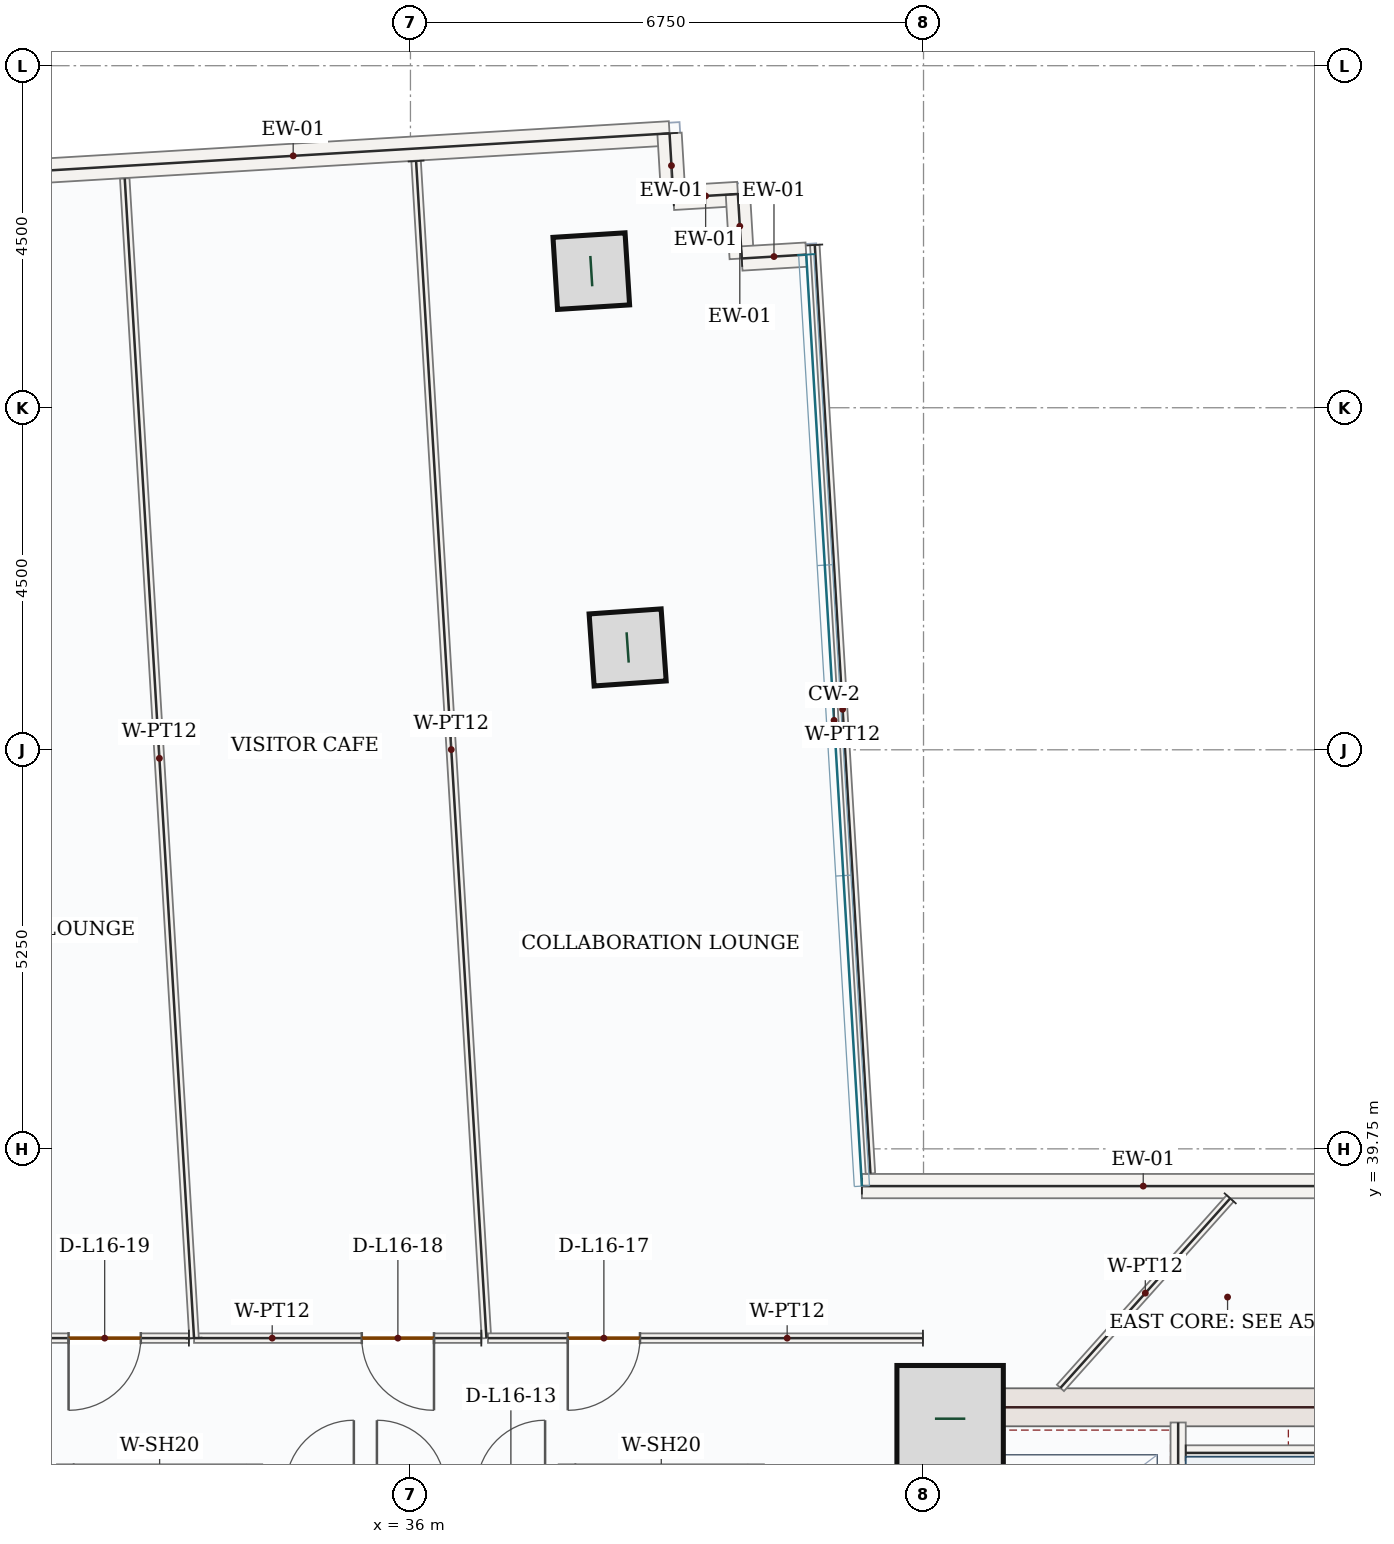
"""IFC4 building model, lengths in metres.
Left out: names, types, materials, properties, quantities, classifications, styles, units other than length and angle.
Written with IfcOpenShell. Run it as: python <this file> out.ifc"""

import sys

from ifc_helpers import new_model, si_unit, direction, frame, frame_2d, origin, origin_2d, place, context, subcontext, project, spatial, rectangle, hollow_rectangle, extrude, source, transform, mapped, element, fill, save


model = new_model("IFC4")
c1 = context("Model", 3, precision=1e-05, world=origin(), true_north=direction((0.0, 1.0)))
c2 = subcontext(c1, "Body", "Model", "MODEL_VIEW")
j1 = project(units=[si_unit("LENGTHUNIT", "METRE"), si_unit("PLANEANGLEUNIT", "RADIAN")], contexts=[c1])
p1 = place(None, origin())
s1 = spatial("IfcSite", under=j1, at=p1, CompositionType="ELEMENT")
p2 = place(p1, origin())
s2 = spatial("IfcBuilding", under=s1, at=p2, CompositionType="ELEMENT")
p3 = place(p2, frame((0.0, 0.0, 75.3)))
s3 = spatial("IfcBuildingStorey", under=s2, at=p3, CompositionType="ELEMENT", Elevation=75.3)
p4 = place(p3, frame((43.0, 28.05, 0.0), z_axis=(0.0, 0.0, 1.0), x_axis=(0.0, 1.0, 0.0)))
e1 = element("IfcWall", 1, at=p4, inside=s3, PredefinedType="SHEAR", context=c2, shape_type="SweptSolid", body=[
    extrude(rectangle(XDim=8.55, YDim=0.5, at=frame_2d((4.275, 0.0))), origin(), (0.0, 0.0, 1.0), 3.95),
])
p5 = place(p4, frame((1.5, 0.0, 0.0)))
e2 = element("IfcOpeningElement", 2, at=p5, cuts=e1, PredefinedType="OPENING", context=c2, shape_type="SweptSolid", body=[
    extrude(rectangle(XDim=1.1, YDim=2.2, at=frame_2d((0.55, 1.1))), frame((0.0, 0.26, 0.0), z_axis=(0.0, -1.0, 0.0), x_axis=(1.0, 0.0, 0.0)), (0.0, 0.0, 1.0), 0.52),
])
m1 = source(origin(), c2, "Body", "SweptSolid", [
    extrude(rectangle(XDim=7.0, YDim=0.5, at=frame_2d((3.5, 0.0))), origin(), (0.0, 0.0, 1.0), 3.95),
])
p6 = place(p3, frame((43.25, 36.35, 0.0), z_axis=(0.0, 0.0, 1.0), x_axis=(1.0, 0.0, 0.0)))
e3 = element("IfcWall", 3, at=p6, inside=s3, PredefinedType="SHEAR", context=c2, shape_type="MappedRepresentation", body=[
    mapped(m1, transform((0.0, 0.0, 0.0), x_axis=(1.0, 0.0, 0.0), y_axis=(0.0, 1.0, 0.0), z_axis=(0.0, 0.0, 1.0), scale=1.0)),
])
m2 = source(origin(), c2, "Body", "SweptSolid", [
    extrude(rectangle(XDim=1.4, YDim=1.4, at=origin_2d()), origin(), (0.0, 0.0, 1.0), 4.2),
])
p7 = place(p3, frame((43.1, 36.2, 0.0), z_axis=(0.0, 0.0, 1.0), x_axis=(1.0, 0.0, 0.0)))
e4 = element("IfcColumn", 4, at=p7, inside=s3, PredefinedType="COLUMN", context=c2, shape_type="MappedRepresentation", body=[
    mapped(m2, transform((0.0, 0.0, 0.0), x_axis=(1.0, 0.0, 0.0), y_axis=(0.0, 1.0, 0.0), z_axis=(0.0, 0.0, 1.0), scale=1.0)),
])
m3 = source(origin(), c2, "Body", "SweptSolid", [
    extrude(hollow_rectangle(XDim=0.95, YDim=0.95, WallThickness=0.05, at=origin_2d()), origin(), (0.0, 0.0, 1.0), 4.2),
])
for number, where, z_axis, x_axis in (
    (5, (38.857, 46.346, 0.0), (0.0, 0.0, 1.0), (-0.07, 0.998, 0.0)),
    (6, (38.379, 51.297, 0.0), (0.0, 0.0, 1.0), (-0.063, 0.998, 0.0)),
):
    element("IfcColumn", number, at=place(p3, frame(where, z_axis=z_axis, x_axis=x_axis)), inside=s3, PredefinedType="COLUMN", context=c2, shape_type="MappedRepresentation", body=[
        mapped(m3, transform((0.0, 0.0, 0.0), x_axis=(1.0, 0.0, 0.0), y_axis=(0.0, 1.0, 0.0), z_axis=(0.0, 0.0, 1.0), scale=1.0)),
    ])
m4 = source(origin(), c2, "Body", "SweptSolid", [
    extrude(rectangle(XDim=9.92, YDim=0.32, at=frame_2d((4.96, 0.0))), origin(), (0.0, 0.0, 1.0), 3.95),
])
p8 = place(p3, frame((29.506, 52.518, 0.0), z_axis=(0.0, 0.0, 1.0), x_axis=(0.998218942745, 0.059656871726, 0.0)))
e7 = element("IfcWall", 7, at=p8, inside=s3, PredefinedType="SOLIDWALL", context=c2, shape_type="MappedRepresentation", body=[
    mapped(m4, transform((0.0, 0.0, 0.0), x_axis=(1.0, 0.0, 0.0), y_axis=(0.0, 1.0, 0.0), z_axis=(0.0, 0.0, 1.0), scale=1.0)),
])
m5 = source(origin(), c2, "Body", "SweptSolid", [
    extrude(rectangle(XDim=0.85, YDim=0.32, at=frame_2d((0.425, 0.0))), origin(), (0.0, 0.0, 1.0), 3.95),
])
p9 = place(p3, frame((39.408, 53.11, 0.0), z_axis=(0.0, 0.0, 1.0), x_axis=(0.059732049764, -0.998214447016, 0.0)))
e8 = element("IfcWall", 8, at=p9, inside=s3, PredefinedType="SOLIDWALL", context=c2, shape_type="MappedRepresentation", body=[
    mapped(m5, transform((0.0, 0.0, 0.0), x_axis=(1.0, 0.0, 0.0), y_axis=(0.0, 1.0, 0.0), z_axis=(0.0, 0.0, 1.0), scale=1.0)),
])
m6 = source(origin(), c2, "Body", "SweptSolid", [
    extrude(rectangle(XDim=0.85, YDim=0.32, at=frame_2d((0.425, 0.0))), origin(), (0.0, 0.0, 1.0), 3.95),
])
for number, where, z_axis, x_axis in (
    (9, (39.459, 52.261, 0.0), (0.0, 0.0, 1.0), (0.998, 0.06, 0.0)),
    (10, (40.308, 52.312, 0.0), (0.0, 0.0, 1.0), (0.06, -0.998, 0.0)),
    (11, (40.358, 51.464, 0.0), (0.0, 0.0, 1.0), (0.998, 0.06, 0.0)),
):
    element("IfcWall", number, at=place(p3, frame(where, z_axis=z_axis, x_axis=x_axis)), inside=s3, PredefinedType="SOLIDWALL", context=c2, shape_type="MappedRepresentation", body=[
        mapped(m6, transform((0.0, 0.0, 0.0), x_axis=(1.0, 0.0, 0.0), y_axis=(0.0, 1.0, 0.0), z_axis=(0.0, 0.0, 1.0), scale=1.0)),
    ])
m7 = source(origin(), c2, "Body", "SweptSolid", [
    extrude(rectangle(XDim=7.403, YDim=0.32, at=frame_2d((3.701, 0.0))), origin(), (0.0, 0.0, 1.0), 3.95),
])
p10 = place(p3, frame((41.939, 39.26, 0.0), z_axis=(0.0, 0.0, 1.0), x_axis=(1.0, 0.0, 0.0)))
e12 = element("IfcWall", 12, at=p10, inside=s3, PredefinedType="SOLIDWALL", context=c2, shape_type="MappedRepresentation", body=[
    mapped(m7, transform((0.0, 0.0, 0.0), x_axis=(1.0, 0.0, 0.0), y_axis=(0.0, 1.0, 0.0), z_axis=(0.0, 0.0, 1.0), scale=1.0)),
])
p11 = place(p3, frame((46.1, 28.15, 0.0), z_axis=(0.0, 0.0, 1.0), x_axis=(0.0, 1.0, 0.0)))
e13 = element("IfcWall", 13, at=p11, inside=s3, PredefinedType="SOLIDWALL", context=c2, shape_type="SweptSolid", body=[
    extrude(rectangle(XDim=8.0, YDim=0.2, at=frame_2d((4.0, 0.0))), origin(), (0.0, 0.0, 1.0), 3.95),
])
p12 = place(p11, frame((0.4, 0.0, 0.0)))
e14 = element("IfcOpeningElement", 14, at=p12, cuts=e13, PredefinedType="OPENING", context=c2, shape_type="SweptSolid", body=[
    extrude(rectangle(XDim=1.05, YDim=2.15, at=frame_2d((0.525, 1.075))), frame((0.0, 0.11, 0.0), z_axis=(0.0, -1.0, 0.0), x_axis=(1.0, 0.0, 0.0)), (0.0, 0.0, 1.0), 0.22),
])
m8 = source(origin(), c2, "Body", "SweptSolid", [
    extrude(rectangle(XDim=3.25, YDim=0.2, at=frame_2d((1.625, 0.0))), origin(), (0.0, 0.0, 1.0), 3.95),
])
p13 = place(p3, frame((46.2, 35.75, 0.0), z_axis=(0.0, 0.0, 1.0), x_axis=(1.0, 0.0, 0.0)))
e15 = element("IfcWall", 15, at=p13, inside=s3, PredefinedType="SOLIDWALL", context=c2, shape_type="MappedRepresentation", body=[
    mapped(m8, transform((0.0, 0.0, 0.0), x_axis=(1.0, 0.0, 0.0), y_axis=(0.0, 1.0, 0.0), z_axis=(0.0, 0.0, 1.0), scale=1.0)),
])
m9 = source(origin(), c2, "Body", "SweptSolid", [
    extrude(rectangle(XDim=2.4, YDim=0.2, at=frame_2d((1.2, 0.0))), origin(), (0.0, 0.0, 1.0), 3.95),
])
for number, where, z_axis, x_axis in (
    (16, (31.45, 33.2, 0.0), (0.0, 0.0, 1.0), (0.0, 1.0, 0.0)),
    (17, (33.95, 33.2, 0.0), (0.0, 0.0, 1.0), (0.0, 1.0, 0.0)),
    (18, (38.05, 33.2, 0.0), (0.0, 0.0, 1.0), (0.0, 1.0, 0.0)),
    (19, (40.55, 33.2, 0.0), (0.0, 0.0, 1.0), (0.0, 1.0, 0.0)),
):
    element("IfcWall", number, at=place(p3, frame(where, z_axis=z_axis, x_axis=x_axis)), inside=s3, PredefinedType="SOLIDWALL", context=c2, shape_type="MappedRepresentation", body=[
        mapped(m9, transform((0.0, 0.0, 0.0), x_axis=(1.0, 0.0, 0.0), y_axis=(0.0, 1.0, 0.0), z_axis=(0.0, 0.0, 1.0), scale=1.0)),
    ])
m10 = source(origin(), c2, "Body", "SweptSolid", [
    extrude(rectangle(XDim=15.513, YDim=0.125, at=frame_2d((7.756, 0.0))), origin(), (0.0, 0.0, 1.0), 3.95),
])
p14 = place(p3, frame((36.074, 52.745, 0.0), z_axis=(0.0, 0.0, 1.0), x_axis=(0.059662086624, -0.998218631072, 0.0)))
e20 = element("IfcWall", 20, at=p14, inside=s3, PredefinedType="PARTITIONING", context=c2, shape_type="MappedRepresentation", body=[
    mapped(m10, transform((0.0, 0.0, 0.0), x_axis=(1.0, 0.0, 0.0), y_axis=(0.0, 1.0, 0.0), z_axis=(0.0, 0.0, 1.0), scale=1.0)),
])
p15 = place(p3, frame((36.932, 37.26, 0.0), z_axis=(0.0, 0.0, 1.0), x_axis=(-1.0, 0.0, 0.0)))
e21 = element("IfcWall", 21, at=p15, inside=s3, PredefinedType="PARTITIONING", context=c2, shape_type="SweptSolid", body=[
    extrude(rectangle(XDim=3.779, YDim=0.125, at=frame_2d((1.89, 0.0))), origin(), (0.0, 0.0, 1.0), 3.95),
])
p16 = place(p15, frame((0.622, 0.0, 0.0)))
e22 = element("IfcOpeningElement", 22, at=p16, cuts=e21, PredefinedType="OPENING", context=c2, shape_type="SweptSolid", body=[
    extrude(rectangle(XDim=0.95, YDim=2.15, at=frame_2d((0.475, 1.075))), frame((0.0, 0.073, 0.0), z_axis=(0.0, -1.0, 0.0), x_axis=(1.0, 0.0, 0.0)), (0.0, 0.0, 1.0), 0.145),
])
m11 = source(origin(), c2, "Body", "SweptSolid", [
    extrude(rectangle(XDim=15.283, YDim=0.125, at=frame_2d((7.642, 0.0))), origin(), (0.0, 0.0, 1.0), 3.95),
])
p17 = place(p3, frame((33.153, 37.26, 0.0), z_axis=(0.0, 0.0, 1.0), x_axis=(-0.059648121824, 0.99821946563, 0.0)))
e23 = element("IfcWall", 23, at=p17, inside=s3, PredefinedType="PARTITIONING", context=c2, shape_type="MappedRepresentation", body=[
    mapped(m11, transform((0.0, 0.0, 0.0), x_axis=(1.0, 0.0, 0.0), y_axis=(0.0, 1.0, 0.0), z_axis=(0.0, 0.0, 1.0), scale=1.0)),
])
p18 = place(p3, frame((33.085, 37.26, 0.0), z_axis=(0.0, 0.0, 1.0), x_axis=(-0.999999997966, -6.3783646e-05, 0.0)))
e24 = element("IfcWall", 24, at=p18, inside=s3, PredefinedType="PARTITIONING", context=c2, shape_type="SweptSolid", body=[
    extrude(rectangle(XDim=3.828, YDim=0.125, at=frame_2d((1.914, 0.0))), origin(), (0.0, 0.0, 1.0), 3.95),
])
p19 = place(p18, frame((0.633, 0.0, 0.0)))
e25 = element("IfcOpeningElement", 25, at=p19, cuts=e24, PredefinedType="OPENING", context=c2, shape_type="SweptSolid", body=[
    extrude(rectangle(XDim=0.95, YDim=2.15, at=frame_2d((0.475, 1.075))), frame((0.0, 0.073, 0.0), z_axis=(0.0, -1.0, 0.0), x_axis=(1.0, 0.0, 0.0)), (0.0, 0.0, 1.0), 0.145),
])
p20 = place(p3, frame((42.742, 37.26, 0.0), z_axis=(0.0, 0.0, 1.0), x_axis=(-0.99999999909, 4.2662116e-05, 0.0)))
e26 = element("IfcWall", 26, at=p20, inside=s3, PredefinedType="PARTITIONING", context=c2, shape_type="SweptSolid", body=[
    extrude(rectangle(XDim=5.723, YDim=0.125, at=frame_2d((2.861, 0.0))), origin(), (0.0, 0.0, 1.0), 3.95),
])
p21 = place(p20, frame((3.723, 0.0, 0.0)))
e27 = element("IfcOpeningElement", 27, at=p21, cuts=e26, PredefinedType="OPENING", context=c2, shape_type="SweptSolid", body=[
    extrude(rectangle(XDim=0.95, YDim=2.15, at=frame_2d((0.475, 1.075))), frame((0.0, 0.073, 0.0), z_axis=(0.0, -1.0, 0.0), x_axis=(1.0, 0.0, 0.0)), (0.0, 0.0, 1.0), 0.145),
])
m12 = source(origin(), c2, "Body", "SweptSolid", [
    extrude(rectangle(XDim=12.238, YDim=0.125, at=frame_2d((6.119, 0.0))), origin(), (0.0, 0.0, 1.0), 3.95),
])
p22 = place(p3, frame((41.32, 51.641, 0.0), z_axis=(0.0, 0.0, 1.0), x_axis=(0.059807214901, -0.998209946377, 0.0)))
e28 = element("IfcWall", 28, at=p22, inside=s3, PredefinedType="PARTITIONING", context=c2, shape_type="MappedRepresentation", body=[
    mapped(m12, transform((0.0, 0.0, 0.0), x_axis=(1.0, 0.0, 0.0), y_axis=(0.0, 1.0, 0.0), z_axis=(0.0, 0.0, 1.0), scale=1.0)),
])
m13 = source(origin(), c2, "Body", "SweptSolid", [
    extrude(rectangle(XDim=3.348, YDim=0.125, at=frame_2d((1.674, 0.0))), origin(), (0.0, 0.0, 1.0), 3.95),
])
p23 = place(p3, frame((46.785, 39.099, 0.0), z_axis=(0.0, 0.0, 1.0), x_axis=(-0.667206176518, -0.74487308853, 0.0)))
e29 = element("IfcWall", 29, at=p23, inside=s3, PredefinedType="PARTITIONING", context=c2, shape_type="MappedRepresentation", body=[
    mapped(m13, transform((0.0, 0.0, 0.0), x_axis=(1.0, 0.0, 0.0), y_axis=(0.0, 1.0, 0.0), z_axis=(0.0, 0.0, 1.0), scale=1.0)),
])
m14 = source(origin(), c2, "Body", "SweptSolid", [
    extrude(rectangle(XDim=0.95, YDim=2.15, at=frame_2d((0.475, 1.075))), frame((0.0, 0.025, 0.0), z_axis=(0.0, -1.0, 0.0), x_axis=(1.0, 0.0, 0.0)), (0.0, 0.0, 1.0), 0.05),
])
p24 = place(p21, origin())
e30 = element("IfcDoor", 30, at=p24, inside=s3, OperationType="SINGLE_SWING_RIGHT", PredefinedType="DOOR", context=c2, shape_type="MappedRepresentation", body=[
    mapped(m14, transform((0.0, 0.0, 0.0), x_axis=(1.0, 0.0, 0.0), y_axis=(0.0, 1.0, 0.0), z_axis=(0.0, 0.0, 1.0), scale=1.0)),
])
fill(e27, e30)
p25 = place(p16, origin())
e31 = element("IfcDoor", 31, at=p25, inside=s3, OperationType="SINGLE_SWING_LEFT", PredefinedType="DOOR", context=c2, shape_type="MappedRepresentation", body=[
    mapped(m14, transform((0.0, 0.0, 0.0), x_axis=(1.0, 0.0, 0.0), y_axis=(0.0, 1.0, 0.0), z_axis=(0.0, 0.0, 1.0), scale=1.0)),
])
fill(e22, e31)
p26 = place(p19, origin())
e32 = element("IfcDoor", 32, at=p26, inside=s3, OperationType="SINGLE_SWING_RIGHT", PredefinedType="DOOR", context=c2, shape_type="MappedRepresentation", body=[
    mapped(m14, transform((0.0, 0.0, 0.0), x_axis=(1.0, 0.0, 0.0), y_axis=(0.0, 1.0, 0.0), z_axis=(0.0, 0.0, 1.0), scale=1.0)),
])
fill(e25, e32)
save(model, sys.argv[1])
